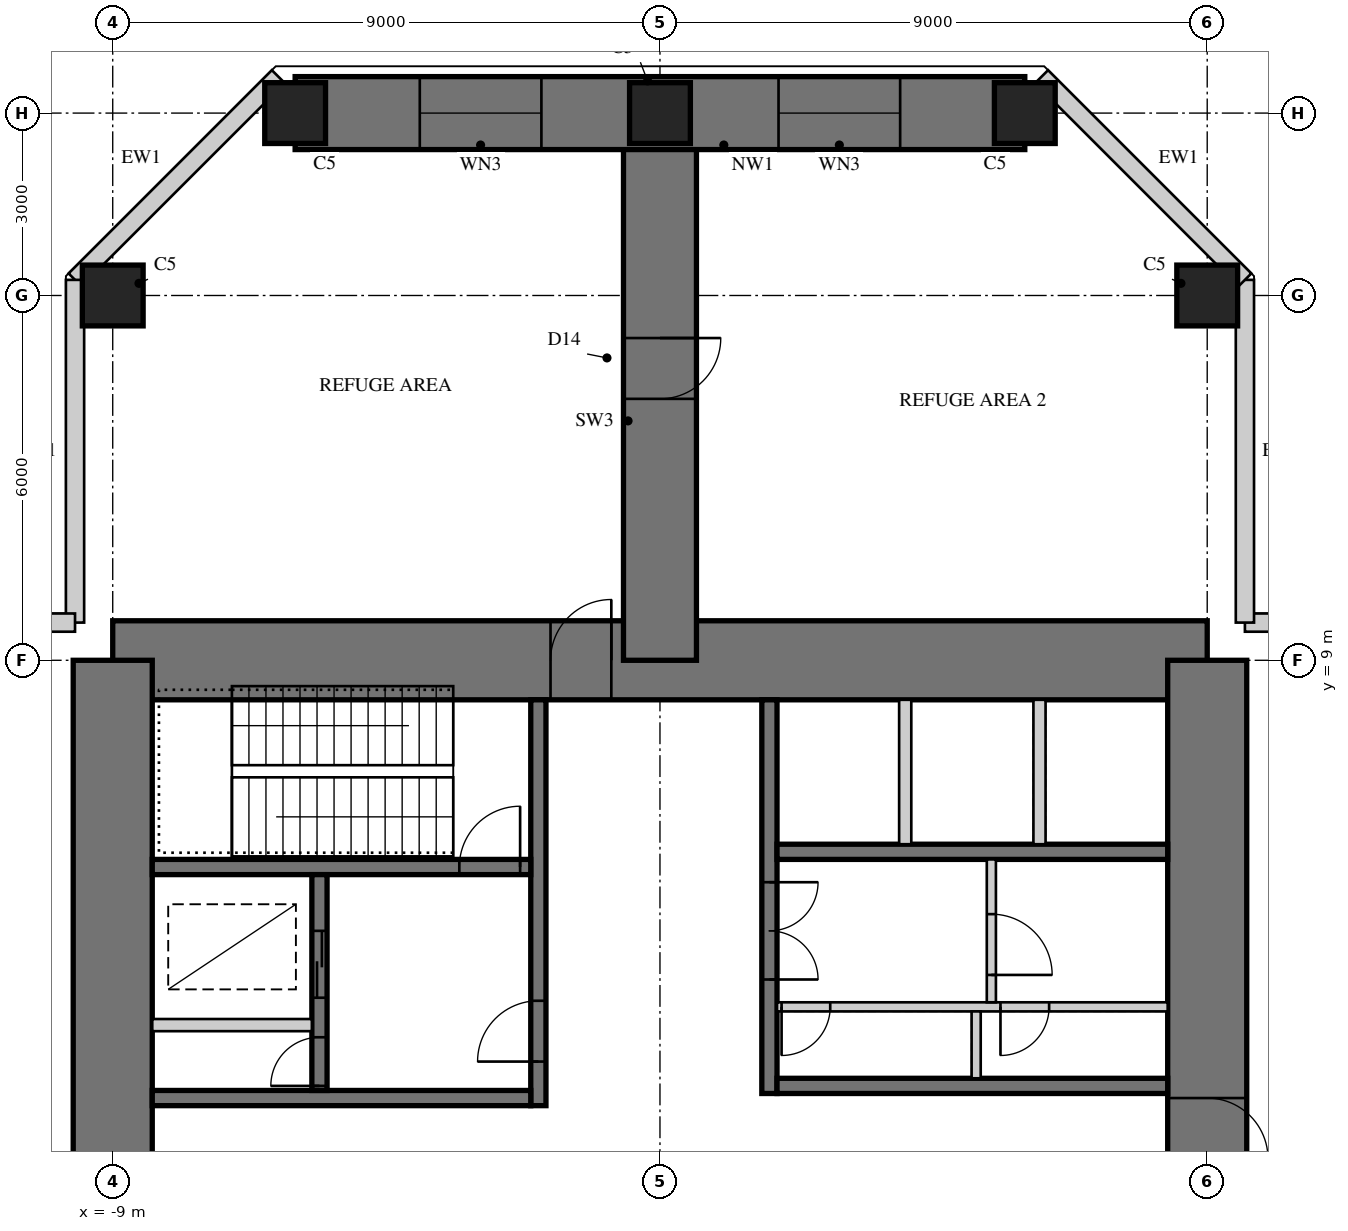
"""IFC4 building model, lengths in metres.
Left out: names, types, materials, properties, quantities, classifications, styles, units other than length and angle.
Written with IfcOpenShell. Run it as: python <this file> out.ifc"""

import sys

from ifc_helpers import new_model, si_unit, direction, frame, frame_2d, origin, origin_2d, place, context, subcontext, project, spatial, rectangle, hollow_rectangle, extrude, element, fill, save


model = new_model("IFC4")
c1 = context("Model", 3, precision=1e-05, world=origin(), true_north=direction((0.0, 1.0)))
c2 = subcontext(c1, "Body", "Model", "MODEL_VIEW")
j1 = project(units=[si_unit("LENGTHUNIT", "METRE"), si_unit("PLANEANGLEUNIT", "RADIAN")], contexts=[c1])
p1 = place(None, origin())
s1 = spatial("IfcSite", under=j1, at=p1, CompositionType="ELEMENT")
p2 = place(p1, origin())
s2 = spatial("IfcBuilding", under=s1, at=p2, CompositionType="ELEMENT")
p3 = place(p2, frame((0.0, 0.0, 164.5)))
s3 = spatial("IfcBuildingStorey", under=s2, at=p3, CompositionType="ELEMENT", Elevation=164.5)
p4 = place(p3, frame((9.0, 9.0, 0.0), z_axis=(0.0, 0.0, 1.0), x_axis=(-1.0, 0.0, 0.0)))
e1 = element("IfcWall", 1, at=p4, inside=s3, PredefinedType="SHEAR", context=c2, shape_type="SweptSolid", body=[
    extrude(rectangle(XDim=18.0, YDim=1.3, at=frame_2d((9.0, 0.0))), origin(), (0.0, 0.0, 1.0), 5.0),
])
p5 = place(p4, frame((9.8, 0.0, 0.0)))
e2 = element("IfcOpeningElement", 2, at=p5, cuts=e1, PredefinedType="OPENING", context=c2, shape_type="SweptSolid", body=[
    extrude(rectangle(XDim=1.0, YDim=2.4, at=frame_2d((0.5, 1.2))), frame((0.0, 0.66, 0.0), z_axis=(0.0, -1.0, 0.0), x_axis=(1.0, 0.0, 0.0)), (0.0, 0.0, 1.0), 1.32),
])
p6 = place(p3, frame((9.0, -9.0, 0.0), z_axis=(0.0, 0.0, 1.0), x_axis=(0.0, 1.0, 0.0)))
e3 = element("IfcWall", 3, at=p6, inside=s3, PredefinedType="SHEAR", context=c2, shape_type="SweptSolid", body=[
    extrude(rectangle(XDim=18.0, YDim=1.3, at=frame_2d((9.0, 0.0))), origin(), (0.0, 0.0, 1.0), 5.0),
])
p7 = place(p6, frame((9.8, 0.0, 0.0)))
e4 = element("IfcOpeningElement", 4, at=p7, cuts=e3, PredefinedType="OPENING", context=c2, shape_type="SweptSolid", body=[
    extrude(rectangle(XDim=1.0, YDim=2.4, at=frame_2d((0.5, 1.2))), frame((0.0, 0.66, 0.0), z_axis=(0.0, -1.0, 0.0), x_axis=(1.0, 0.0, 0.0)), (0.0, 0.0, 1.0), 1.32),
])
p8 = place(p3, frame((-9.0, 9.0, 0.0), z_axis=(0.0, 0.0, 1.0), x_axis=(0.0, -1.0, 0.0)))
e5 = element("IfcWall", 5, at=p8, inside=s3, PredefinedType="SHEAR", context=c2, shape_type="SweptSolid", body=[
    extrude(rectangle(XDim=18.0, YDim=1.3, at=frame_2d((9.0, 0.0))), origin(), (0.0, 0.0, 1.0), 5.0),
])
p9 = place(p8, frame((9.8, 0.0, 0.0)))
e6 = element("IfcOpeningElement", 6, at=p9, cuts=e5, PredefinedType="OPENING", context=c2, shape_type="SweptSolid", body=[
    extrude(rectangle(XDim=1.0, YDim=2.4, at=frame_2d((0.5, 1.2))), frame((0.0, 0.66, 0.0), z_axis=(0.0, -1.0, 0.0), x_axis=(1.0, 0.0, 0.0)), (0.0, 0.0, 1.0), 1.32),
])
p10 = place(p3, frame((1.8, 1.875, 0.0), z_axis=(0.0, 0.0, 1.0), x_axis=(0.0, 1.0, 0.0)))
e7 = element("IfcWall", 7, at=p10, inside=s3, PredefinedType="SHEAR", context=c2, shape_type="SweptSolid", body=[
    extrude(rectangle(XDim=6.475, YDim=0.25, at=frame_2d((3.238, 0.0))), origin(), (0.0, 0.0, 1.0), 5.0),
])
p11 = place(p10, frame((1.875, 0.0, 0.0)))
e8 = element("IfcOpeningElement", 8, at=p11, cuts=e7, PredefinedType="OPENING", context=c2, shape_type="SweptSolid", body=[
    extrude(rectangle(XDim=1.6, YDim=2.4, at=frame_2d((0.8, 1.2))), frame((0.0, 0.135, 0.0), z_axis=(0.0, -1.0, 0.0), x_axis=(1.0, 0.0, 0.0)), (0.0, 0.0, 1.0), 0.27),
])
for number, where, z_axis, x_axis in (
    (9, (1.925, 2.0, 0.0), (0.0, 0.0, 1.0), (1.0, 0.0, 0.0)),
    (10, (1.925, 5.85, 0.0), (0.0, 0.0, 1.0), (1.0, 0.0, 0.0)),
):
    element("IfcWall", number, at=place(p3, frame(where, z_axis=z_axis, x_axis=x_axis)), inside=s3, PredefinedType="SHEAR", context=c2, shape_type="SweptSolid", body=[
        extrude(rectangle(XDim=6.425, YDim=0.25, at=frame_2d((3.212, 0.0))), origin(), (0.0, 0.0, 1.0), 5.0),
    ])
p12 = place(p3, frame((1.925, 3.3, 0.0), z_axis=(0.0, 0.0, 1.0), x_axis=(1.0, 0.0, 0.0)))
e11 = element("IfcWall", 11, at=p12, inside=s3, PredefinedType="PARTITIONING", context=c2, shape_type="SweptSolid", body=[
    extrude(rectangle(XDim=6.425, YDim=0.15, at=frame_2d((3.212, 0.0))), origin(), (0.0, 0.0, 1.0), 5.0),
])
p13 = place(p12, frame((0.075, 0.0, 0.0)))
e12 = element("IfcOpeningElement", 12, at=p13, cuts=e11, PredefinedType="OPENING", context=c2, shape_type="SweptSolid", body=[
    extrude(rectangle(XDim=0.8, YDim=2.1, at=frame_2d((0.4, 1.05))), frame((0.0, 0.085, 0.0), z_axis=(0.0, -1.0, 0.0), x_axis=(1.0, 0.0, 0.0)), (0.0, 0.0, 1.0), 0.17),
])
p14 = place(p12, frame((3.675, 0.0, 0.0)))
e13 = element("IfcOpeningElement", 13, at=p14, cuts=e11, PredefinedType="OPENING", context=c2, shape_type="SweptSolid", body=[
    extrude(rectangle(XDim=0.8, YDim=2.1, at=frame_2d((0.4, 1.05))), frame((0.0, 0.085, 0.0), z_axis=(0.0, -1.0, 0.0), x_axis=(1.0, 0.0, 0.0)), (0.0, 0.0, 1.0), 0.17),
])
p15 = place(p3, frame((5.2, 2.125, 0.0), z_axis=(0.0, 0.0, 1.0), x_axis=(0.0, 1.0, 0.0)))
e14 = element("IfcWall", 14, at=p15, inside=s3, PredefinedType="PARTITIONING", context=c2, shape_type="SweptSolid", body=[
    extrude(rectangle(XDim=1.1, YDim=0.15, at=frame_2d((0.55, 0.0))), origin(), (0.0, 0.0, 1.0), 5.0),
])
for number, where, z_axis, x_axis in (
    (15, (4.033, 5.975, 0.0), (0.0, 0.0, 1.0), (0.0, 1.0, 0.0)),
    (16, (6.242, 5.975, 0.0), (0.0, 0.0, 1.0), (0.0, 1.0, 0.0)),
):
    element("IfcWall", number, at=place(p3, frame(where, z_axis=z_axis, x_axis=x_axis)), inside=s3, PredefinedType="PARTITIONING", context=c2, shape_type="SweptSolid", body=[
        extrude(rectangle(XDim=2.375, YDim=0.2, at=frame_2d((1.188, 0.0))), origin(), (0.0, 0.0, 1.0), 5.0),
    ])
p16 = place(p3, frame((-2.0, 1.675, 0.0), z_axis=(0.0, 0.0, 1.0), x_axis=(0.0, 1.0, 0.0)))
e17 = element("IfcWall", 17, at=p16, inside=s3, PredefinedType="SHEAR", context=c2, shape_type="SweptSolid", body=[
    extrude(rectangle(XDim=6.675, YDim=0.25, at=frame_2d((3.337, 0.0))), origin(), (0.0, 0.0, 1.0), 5.0),
])
p17 = place(p16, frame((0.725, 0.0, 0.0)))
e18 = element("IfcOpeningElement", 18, at=p17, cuts=e17, PredefinedType="OPENING", context=c2, shape_type="SweptSolid", body=[
    extrude(rectangle(XDim=1.0, YDim=2.1, at=frame_2d((0.5, 1.05))), frame((0.0, 0.135, 0.0), z_axis=(0.0, -1.0, 0.0), x_axis=(1.0, 0.0, 0.0)), (0.0, 0.0, 1.0), 0.27),
])
p18 = place(p3, frame((-2.125, 1.8, 0.0), z_axis=(0.0, 0.0, 1.0), x_axis=(-1.0, 0.0, 0.0)))
e19 = element("IfcWall", 19, at=p18, inside=s3, PredefinedType="SHEAR", context=c2, shape_type="SweptSolid", body=[
    extrude(rectangle(XDim=6.225, YDim=0.25, at=frame_2d((3.113, 0.0))), origin(), (0.0, 0.0, 1.0), 5.0),
])
p19 = place(p3, frame((-2.125, 5.6, 0.0), z_axis=(0.0, 0.0, 1.0), x_axis=(-1.0, 0.0, 0.0)))
e20 = element("IfcWall", 20, at=p19, inside=s3, PredefinedType="SHEAR", context=c2, shape_type="SweptSolid", body=[
    extrude(rectangle(XDim=6.225, YDim=0.25, at=frame_2d((3.113, 0.0))), origin(), (0.0, 0.0, 1.0), 5.0),
])
p20 = place(p19, frame((0.175, 0.0, 0.0)))
e21 = element("IfcOpeningElement", 21, at=p20, cuts=e20, PredefinedType="OPENING", context=c2, shape_type="SweptSolid", body=[
    extrude(rectangle(XDim=1.0, YDim=2.1, at=frame_2d((0.5, 1.05))), frame((0.0, 0.135, 0.0), z_axis=(0.0, -1.0, 0.0), x_axis=(1.0, 0.0, 0.0)), (0.0, 0.0, 1.0), 0.27),
])
p21 = place(p3, frame((-5.6, 1.925, 0.0), z_axis=(0.0, 0.0, 1.0), x_axis=(0.0, 1.0, 0.0)))
e22 = element("IfcWall", 22, at=p21, inside=s3, PredefinedType="SHEAR", context=c2, shape_type="SweptSolid", body=[
    extrude(rectangle(XDim=3.55, YDim=0.25, at=frame_2d((1.775, 0.0))), origin(), (0.0, 0.0, 1.0), 5.0),
])
p22 = place(p21, frame((1.525, 0.0, 0.0)))
e23 = element("IfcOpeningElement", 23, at=p22, cuts=e22, PredefinedType="OPENING", context=c2, shape_type="SweptSolid", body=[
    extrude(rectangle(XDim=1.1, YDim=2.2, at=frame_2d((0.55, 1.1))), frame((0.0, 0.135, 0.0), z_axis=(0.0, -1.0, 0.0), x_axis=(1.0, 0.0, 0.0)), (0.0, 0.0, 1.0), 0.27),
])
p23 = place(p21, frame((0.075, 0.0, 0.0)))
e24 = element("IfcOpeningElement", 24, at=p23, cuts=e22, PredefinedType="OPENING", context=c2, shape_type="SweptSolid", body=[
    extrude(rectangle(XDim=0.8, YDim=2.1, at=frame_2d((0.4, 1.05))), frame((0.0, 0.135, 0.0), z_axis=(0.0, -1.0, 0.0), x_axis=(1.0, 0.0, 0.0)), (0.0, 0.0, 1.0), 0.27),
])
p24 = place(p3, frame((-5.725, 3.0, 0.0), z_axis=(0.0, 0.0, 1.0), x_axis=(-1.0, 0.0, 0.0)))
e25 = element("IfcWall", 25, at=p24, inside=s3, PredefinedType="PARTITIONING", context=c2, shape_type="SweptSolid", body=[
    extrude(rectangle(XDim=2.625, YDim=0.2, at=frame_2d((1.312, 0.0))), origin(), (0.0, 0.0, 1.0), 5.0),
])
p25 = place(p3, frame((0.0, 9.0, 0.0), z_axis=(0.0, 0.0, 1.0), x_axis=(0.0, 1.0, 0.0)))
e26 = element("IfcWall", 26, at=p25, inside=s3, PredefinedType="SHEAR", context=c2, shape_type="SweptSolid", body=[
    extrude(rectangle(XDim=9.0, YDim=1.2, at=frame_2d((4.5, 0.0))), origin(), (0.0, 0.0, 1.0), 5.0),
])
p26 = place(p25, frame((4.3, 0.0, 0.0)))
e27 = element("IfcOpeningElement", 27, at=p26, cuts=e26, PredefinedType="OPENING", context=c2, shape_type="SweptSolid", body=[
    extrude(rectangle(XDim=1.0, YDim=2.2, at=frame_2d((0.5, 1.1))), frame((0.0, 0.61, 0.0), z_axis=(0.0, -1.0, 0.0), x_axis=(1.0, 0.0, 0.0)), (0.0, 0.0, 1.0), 1.22),
])
p27 = place(p3, frame((6.0, 18.0, 0.0), z_axis=(0.0, 0.0, 1.0), x_axis=(-1.0, 0.0, 0.0)))
e28 = element("IfcWall", 28, at=p27, inside=s3, PredefinedType="SHEAR", context=c2, shape_type="SweptSolid", body=[
    extrude(rectangle(XDim=12.0, YDim=1.2, at=frame_2d((6.0, 0.0))), origin(), (0.0, 0.0, 1.0), 5.0),
])
p28 = place(p27, frame((2.05, 0.0, 0.8)))
e29 = element("IfcOpeningElement", 29, at=p28, cuts=e28, PredefinedType="OPENING", context=c2, shape_type="SweptSolid", body=[
    extrude(rectangle(XDim=2.0, YDim=2.5, at=frame_2d((1.0, 1.25))), frame((0.0, 0.61, 0.0), z_axis=(0.0, -1.0, 0.0), x_axis=(1.0, 0.0, 0.0)), (0.0, 0.0, 1.0), 1.22),
])
p29 = place(p27, frame((7.95, 0.0, 0.8)))
e30 = element("IfcOpeningElement", 30, at=p29, cuts=e28, PredefinedType="OPENING", context=c2, shape_type="SweptSolid", body=[
    extrude(rectangle(XDim=2.0, YDim=2.5, at=frame_2d((1.0, 1.25))), frame((0.0, 0.61, 0.0), z_axis=(0.0, -1.0, 0.0), x_axis=(1.0, 0.0, 0.0)), (0.0, 0.0, 1.0), 1.22),
])
for number, where, z_axis, x_axis in (
    (31, (9.0, 15.0, 0.0), (0.0, 0.0, 1.0), (1.0, 0.0, 0.0)),
    (32, (-9.0, 15.0, 0.0), (0.0, 0.0, 1.0), (1.0, 0.0, 0.0)),
    (33, (6.0, 18.0, 0.0), (0.0, 0.0, 1.0), (1.0, 0.0, 0.0)),
    (34, (0.0, 18.0, 0.0), (0.0, 0.0, 1.0), (1.0, 0.0, 0.0)),
    (35, (-6.0, 18.0, 0.0), (0.0, 0.0, 1.0), (1.0, 0.0, 0.0)),
):
    element("IfcColumn", number, at=place(p3, frame(where, z_axis=z_axis, x_axis=x_axis)), inside=s3, PredefinedType="COLUMN", context=c2, shape_type="SweptSolid", body=[
        extrude(rectangle(XDim=1.0, YDim=1.0, at=origin_2d()), origin(), (0.0, 0.0, 1.0), 5.0),
    ])
p30 = place(p3, frame((24.257, 9.62, 0.0), z_axis=(0.0, 0.0, 1.0), x_axis=(-1.0, 0.0, 0.0)))
e36 = element("IfcWall", 36, at=p30, inside=s3, PredefinedType="SOLIDWALL", context=c2, shape_type="SweptSolid", body=[
    extrude(rectangle(XDim=14.637, YDim=0.3, at=frame_2d((7.318, 0.0))), origin(), (0.0, 0.0, 1.0), 4.82),
])
p31 = place(p3, frame((9.62, 9.62, 0.0), z_axis=(0.0, 0.0, 1.0), x_axis=(0.0, 1.0, 0.0)))
e37 = element("IfcWall", 37, at=p31, inside=s3, PredefinedType="SOLIDWALL", context=c2, shape_type="SweptSolid", body=[
    extrude(rectangle(XDim=5.637, YDim=0.3, at=frame_2d((2.818, 0.0))), origin(), (0.0, 0.0, 1.0), 4.82),
])
for number, where, z_axis, x_axis in (
    (38, (9.62, 15.257, 0.0), (0.0, 0.0, 1.0), (-0.707, 0.707, 0.0)),
    (39, (-6.277, 18.6, 0.0), (0.0, 0.0, 1.0), (-0.707, -0.707, 0.0)),
):
    element("IfcWall", number, at=place(p3, frame(where, z_axis=z_axis, x_axis=x_axis)), inside=s3, PredefinedType="SOLIDWALL", context=c2, shape_type="SweptSolid", body=[
        extrude(rectangle(XDim=4.728, YDim=0.3, at=frame_2d((2.364, 0.0))), origin(), (0.0, 0.0, 1.0), 4.82),
    ])
p32 = place(p3, frame((-9.62, 15.257, 0.0), z_axis=(0.0, 0.0, 1.0), x_axis=(0.0, -1.0, 0.0)))
e40 = element("IfcWall", 40, at=p32, inside=s3, PredefinedType="SOLIDWALL", context=c2, shape_type="SweptSolid", body=[
    extrude(rectangle(XDim=5.637, YDim=0.3, at=frame_2d((2.818, 0.0))), origin(), (0.0, 0.0, 1.0), 4.82),
])
p33 = place(p3, frame((-9.62, 9.62, 0.0), z_axis=(0.0, 0.0, 1.0), x_axis=(-1.0, 0.0, 0.0)))
e41 = element("IfcWall", 41, at=p33, inside=s3, PredefinedType="SOLIDWALL", context=c2, shape_type="SweptSolid", body=[
    extrude(rectangle(XDim=14.637, YDim=0.3, at=frame_2d((7.318, 0.0))), origin(), (0.0, 0.0, 1.0), 4.82),
])
p34 = place(p33, frame((0.464, 0.0, 0.8)))
e42 = element("IfcOpeningElement", 42, at=p34, cuts=e41, PredefinedType="OPENING", context=c2, shape_type="SweptSolid", body=[
    extrude(rectangle(XDim=2.0, YDim=2.5, at=frame_2d((1.0, 1.25))), frame((0.0, 0.16, 0.0), z_axis=(0.0, -1.0, 0.0), x_axis=(1.0, 0.0, 0.0)), (0.0, 0.0, 1.0), 0.32),
])
p35 = place(p33, frame((6.318, 0.0, 0.8)))
e43 = element("IfcOpeningElement", 43, at=p35, cuts=e41, PredefinedType="OPENING", context=c2, shape_type="SweptSolid", body=[
    extrude(rectangle(XDim=2.0, YDim=2.5, at=frame_2d((1.0, 1.25))), frame((0.0, 0.16, 0.0), z_axis=(0.0, -1.0, 0.0), x_axis=(1.0, 0.0, 0.0)), (0.0, 0.0, 1.0), 0.32),
])
p36 = place(p33, frame((9.246, 0.0, 0.8)))
e44 = element("IfcOpeningElement", 44, at=p36, cuts=e41, PredefinedType="OPENING", context=c2, shape_type="SweptSolid", body=[
    extrude(rectangle(XDim=2.0, YDim=2.5, at=frame_2d((1.0, 1.25))), frame((0.0, 0.16, 0.0), z_axis=(0.0, -1.0, 0.0), x_axis=(1.0, 0.0, 0.0)), (0.0, 0.0, 1.0), 0.32),
])
p37 = place(p3, frame((5.45, 3.375, 0.0), z_axis=(0.0, 0.0, 1.0), x_axis=(0.0, 1.0, 0.0)))
e45 = element("IfcWall", 45, at=p37, inside=s3, PredefinedType="PARTITIONING", context=c2, shape_type="SweptSolid", body=[
    extrude(rectangle(XDim=2.35, YDim=0.15, at=frame_2d((1.175, 0.0))), origin(), (0.0, 0.0, 1.0), 4.82),
])
p38 = place(p37, frame((0.45, 0.0, 0.0)))
e46 = element("IfcOpeningElement", 46, at=p38, cuts=e45, PredefinedType="OPENING", context=c2, shape_type="SweptSolid", body=[
    extrude(rectangle(XDim=1.0, YDim=2.1, at=frame_2d((0.5, 1.05))), frame((0.0, 0.085, 0.0), z_axis=(0.0, -1.0, 0.0), x_axis=(1.0, 0.0, 0.0)), (0.0, 0.0, 1.0), 0.17),
])
p39 = place(p28, origin())
e47 = element("IfcWindow", 47, at=p39, inside=s3, PartitioningType="SINGLE_PANEL", PredefinedType="WINDOW", context=c2, shape_type="SweptSolid", body=[
    extrude(hollow_rectangle(XDim=2.0, YDim=2.5, WallThickness=0.06, at=frame_2d((1.0, 1.25))), frame((0.0, 0.03, 0.0), z_axis=(0.0, -1.0, 0.0), x_axis=(1.0, 0.0, 0.0)), (0.0, 0.0, 1.0), 0.06),
    extrude(rectangle(XDim=1.879, YDim=2.379, at=frame_2d((1.0, 1.25))), frame((0.0, 0.03, 0.0), z_axis=(0.0, -1.0, 0.0), x_axis=(1.0, 0.0, 0.0)), (0.0, 0.0, 1.0), 0.06),
])
fill(e29, e47)
p40 = place(p29, origin())
e48 = element("IfcWindow", 48, at=p40, inside=s3, PartitioningType="SINGLE_PANEL", PredefinedType="WINDOW", context=c2, shape_type="SweptSolid", body=[
    extrude(hollow_rectangle(XDim=2.0, YDim=2.5, WallThickness=0.06, at=frame_2d((1.0, 1.25))), frame((0.0, 0.03, 0.0), z_axis=(0.0, -1.0, 0.0), x_axis=(1.0, 0.0, 0.0)), (0.0, 0.0, 1.0), 0.06),
    extrude(rectangle(XDim=1.879, YDim=2.379, at=frame_2d((1.0, 1.25))), frame((0.0, 0.03, 0.0), z_axis=(0.0, -1.0, 0.0), x_axis=(1.0, 0.0, 0.0)), (0.0, 0.0, 1.0), 0.06),
])
fill(e30, e48)
p41 = place(p38, frame((1.0, 0.0, 0.0), z_axis=(0.0, 0.0, 1.0), x_axis=(-1.0, 0.0, 0.0)))
e49 = element("IfcDoor", 49, at=p41, inside=s3, OperationType="SINGLE_SWING_RIGHT", PredefinedType="DOOR", context=c2, shape_type="SweptSolid", body=[
    extrude(rectangle(XDim=1.0, YDim=2.1, at=frame_2d((0.5, 1.05))), frame((0.0, 0.025, 0.0), z_axis=(0.0, -1.0, 0.0), x_axis=(1.0, 0.0, 0.0)), (0.0, 0.0, 1.0), 0.05),
])
fill(e46, e49)
p42 = place(p26, frame((1.0, 0.0, 0.0), z_axis=(0.0, 0.0, 1.0), x_axis=(-1.0, 0.0, 0.0)))
e50 = element("IfcDoor", 50, at=p42, inside=s3, OperationType="SINGLE_SWING_LEFT", PredefinedType="DOOR", context=c2, shape_type="SweptSolid", body=[
    extrude(rectangle(XDim=1.0, YDim=2.2, at=frame_2d((0.5, 1.1))), frame((0.0, 0.025, 0.0), z_axis=(0.0, -1.0, 0.0), x_axis=(1.0, 0.0, 0.0)), (0.0, 0.0, 1.0), 0.05),
])
fill(e27, e50)
p43 = place(p5, frame((1.0, 0.0, 0.0), z_axis=(0.0, 0.0, 1.0), x_axis=(-1.0, 0.0, 0.0)))
e51 = element("IfcDoor", 51, at=p43, inside=s3, OperationType="SINGLE_SWING_RIGHT", PredefinedType="DOOR", context=c2, shape_type="SweptSolid", body=[
    extrude(rectangle(XDim=1.0, YDim=2.4, at=frame_2d((0.5, 1.2))), frame((0.0, -0.005, 0.0), z_axis=(0.0, -1.0, 0.0), x_axis=(1.0, 0.0, 0.0)), (0.0, 0.0, 1.0), 0.05),
])
fill(e2, e51)
p44 = place(p7, frame((1.0, 0.0, 0.0), z_axis=(0.0, 0.0, 1.0), x_axis=(-1.0, 0.0, 0.0)))
e52 = element("IfcDoor", 52, at=p44, inside=s3, OperationType="SINGLE_SWING_RIGHT", PredefinedType="DOOR", context=c2, shape_type="SweptSolid", body=[
    extrude(rectangle(XDim=1.0, YDim=2.4, at=frame_2d((0.5, 1.2))), frame((0.0, -0.005, 0.0), z_axis=(0.0, -1.0, 0.0), x_axis=(1.0, 0.0, 0.0)), (0.0, 0.0, 1.0), 0.05),
])
fill(e4, e52)
p45 = place(p11, frame((1.6, 0.0, 0.0), z_axis=(0.0, 0.0, 1.0), x_axis=(-1.0, 0.0, 0.0)))
e53 = element("IfcDoor", 53, at=p45, inside=s3, OperationType="DOUBLE_DOOR_SINGLE_SWING", PredefinedType="DOOR", context=c2, shape_type="SweptSolid", body=[
    extrude(rectangle(XDim=1.6, YDim=2.4, at=frame_2d((0.8, 1.2))), frame((0.0, 0.025, 0.0), z_axis=(0.0, -1.0, 0.0), x_axis=(1.0, 0.0, 0.0)), (0.0, 0.0, 1.0), 0.05),
])
fill(e8, e53)
p46 = place(p13, frame((0.8, 0.0, 0.0), z_axis=(0.0, 0.0, 1.0), x_axis=(-1.0, 0.0, 0.0)))
e54 = element("IfcDoor", 54, at=p46, inside=s3, OperationType="SINGLE_SWING_RIGHT", PredefinedType="DOOR", context=c2, shape_type="SweptSolid", body=[
    extrude(rectangle(XDim=0.8, YDim=2.1, at=frame_2d((0.4, 1.05))), frame((0.0, 0.025, 0.0), z_axis=(0.0, -1.0, 0.0), x_axis=(1.0, 0.0, 0.0)), (0.0, 0.0, 1.0), 0.05),
])
fill(e12, e54)
p47 = place(p14, frame((0.8, 0.0, 0.0), z_axis=(0.0, 0.0, 1.0), x_axis=(-1.0, 0.0, 0.0)))
e55 = element("IfcDoor", 55, at=p47, inside=s3, OperationType="SINGLE_SWING_RIGHT", PredefinedType="DOOR", context=c2, shape_type="SweptSolid", body=[
    extrude(rectangle(XDim=0.8, YDim=2.1, at=frame_2d((0.4, 1.05))), frame((0.0, 0.025, 0.0), z_axis=(0.0, -1.0, 0.0), x_axis=(1.0, 0.0, 0.0)), (0.0, 0.0, 1.0), 0.05),
])
fill(e13, e55)
p48 = place(p17, origin())
e56 = element("IfcDoor", 56, at=p48, inside=s3, OperationType="SINGLE_SWING_LEFT", PredefinedType="DOOR", context=c2, shape_type="SweptSolid", body=[
    extrude(rectangle(XDim=1.0, YDim=2.1, at=frame_2d((0.5, 1.05))), frame((0.0, 0.025, 0.0), z_axis=(0.0, -1.0, 0.0), x_axis=(1.0, 0.0, 0.0)), (0.0, 0.0, 1.0), 0.05),
])
fill(e18, e56)
p49 = place(p20, frame((1.0, 0.0, 0.0), z_axis=(0.0, 0.0, 1.0), x_axis=(-1.0, 0.0, 0.0)))
e57 = element("IfcDoor", 57, at=p49, inside=s3, OperationType="SINGLE_SWING_RIGHT", PredefinedType="DOOR", context=c2, shape_type="SweptSolid", body=[
    extrude(rectangle(XDim=1.0, YDim=2.1, at=frame_2d((0.5, 1.05))), frame((0.0, 0.025, 0.0), z_axis=(0.0, -1.0, 0.0), x_axis=(1.0, 0.0, 0.0)), (0.0, 0.0, 1.0), 0.05),
])
fill(e21, e57)
p50 = place(p22, origin())
e58 = element("IfcDoor", 58, at=p50, inside=s3, OperationType="DOUBLE_DOOR_SLIDING", PredefinedType="DOOR", context=c2, shape_type="SweptSolid", body=[
    extrude(rectangle(XDim=1.1, YDim=2.2, at=frame_2d((0.55, 1.1))), frame((0.0, 0.025, 0.0), z_axis=(0.0, -1.0, 0.0), x_axis=(1.0, 0.0, 0.0)), (0.0, 0.0, 1.0), 0.05),
])
fill(e23, e58)
p51 = place(p23, origin())
e59 = element("IfcDoor", 59, at=p51, inside=s3, OperationType="SINGLE_SWING_LEFT", PredefinedType="DOOR", context=c2, shape_type="SweptSolid", body=[
    extrude(rectangle(XDim=0.8, YDim=2.1, at=frame_2d((0.4, 1.05))), frame((0.0, 0.025, 0.0), z_axis=(0.0, -1.0, 0.0), x_axis=(1.0, 0.0, 0.0)), (0.0, 0.0, 1.0), 0.05),
])
fill(e24, e59)
save(model, sys.argv[1])
